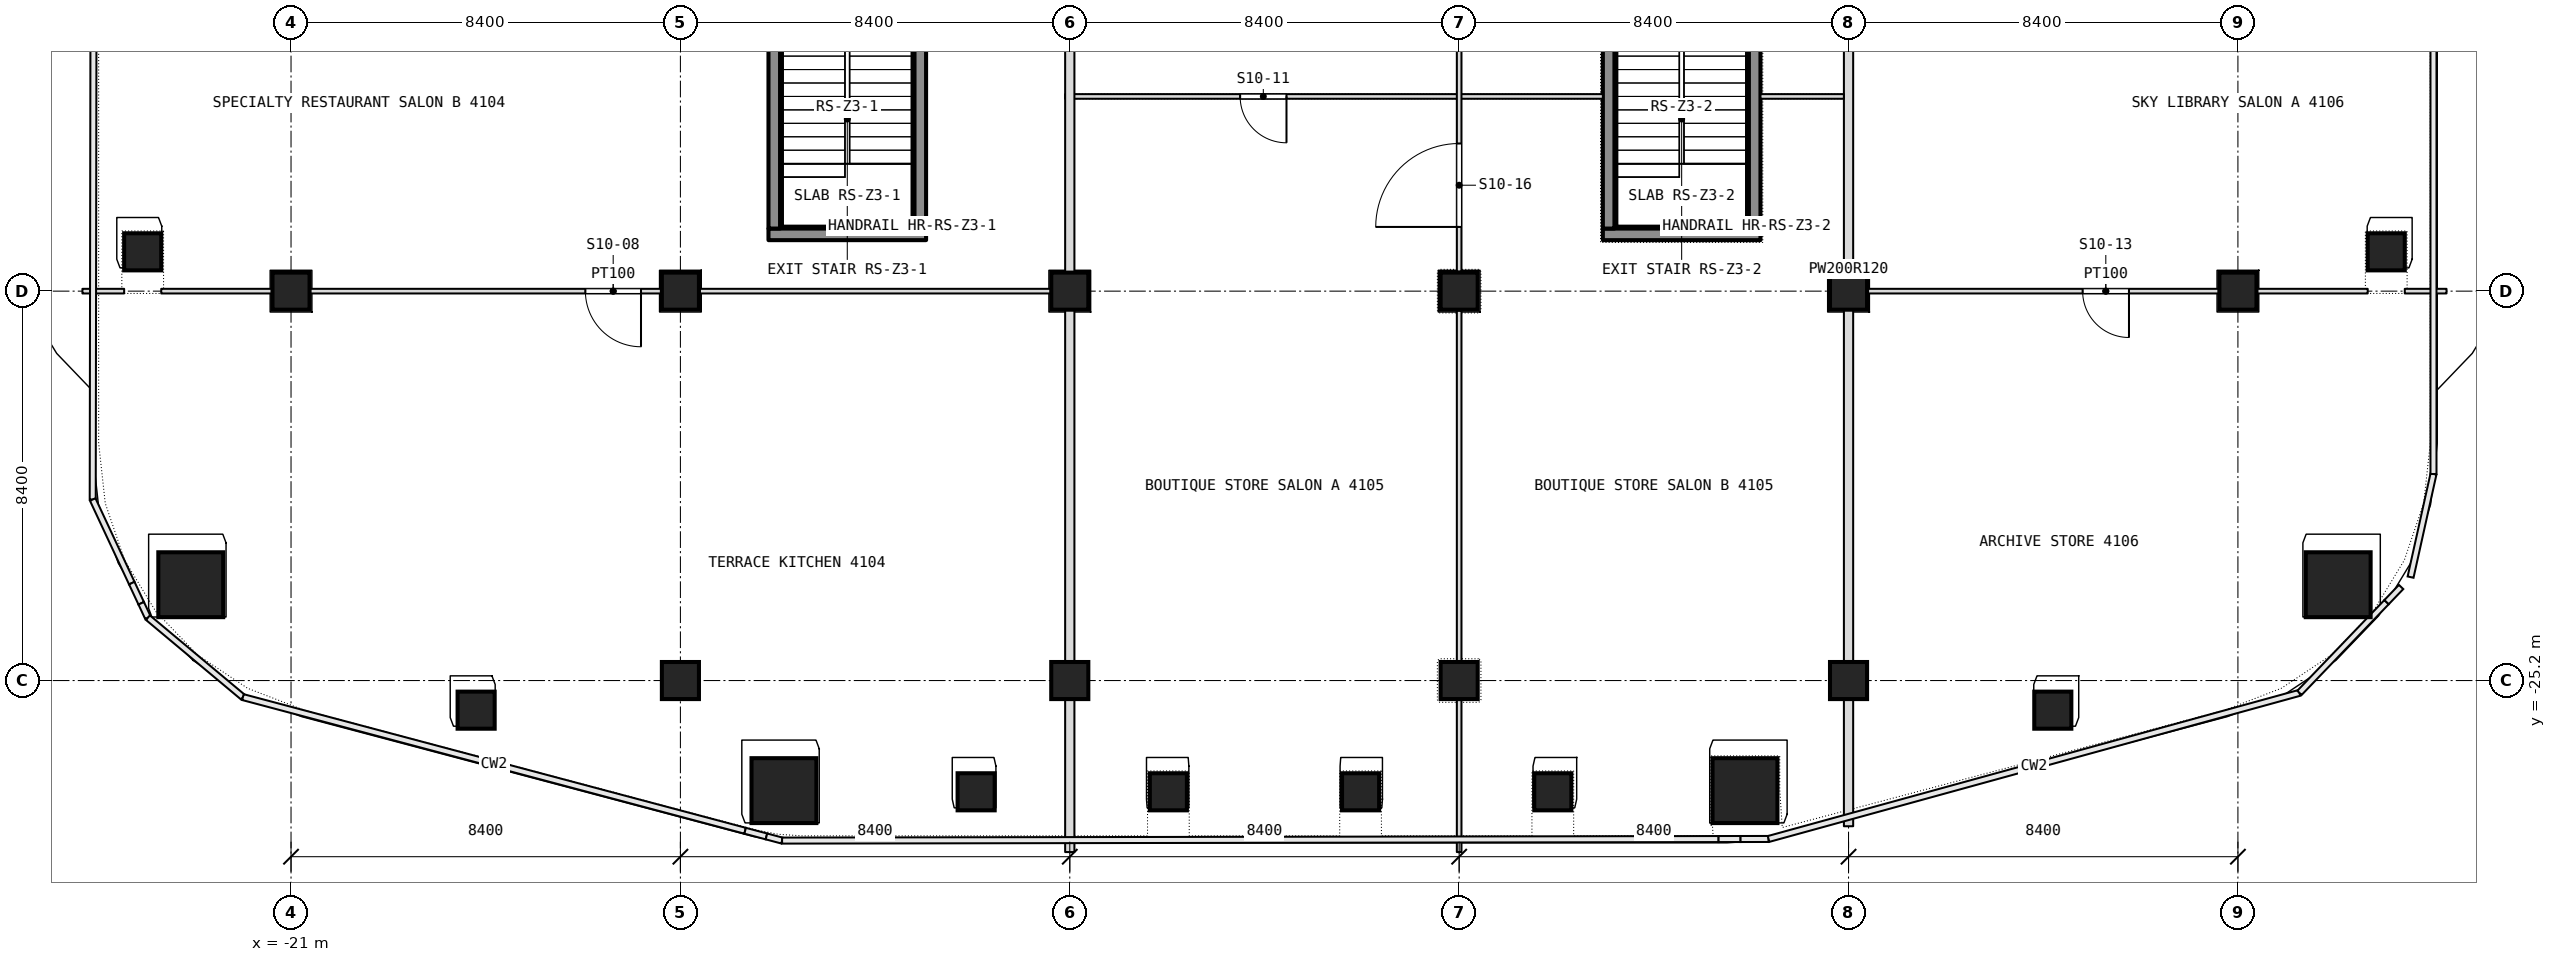
"""IFC4 building model, lengths in metres.
Left out: names, types, materials, properties, quantities, classifications, styles, units other than length and angle.
Written with IfcOpenShell. Run it as: python <this file> out.ifc"""

import sys

from ifc_helpers import new_model, si_unit, direction, frame, frame_2d, origin, origin_2d, place, context, subcontext, project, spatial, rectangle, extrude, element, fill, save


model = new_model("IFC4")
c1 = context("Model", 3, precision=1e-05, world=origin(), true_north=direction((0.0, 1.0)))
c2 = subcontext(c1, "Body", "Model", "MODEL_VIEW")
j1 = project(units=[si_unit("LENGTHUNIT", "METRE"), si_unit("PLANEANGLEUNIT", "RADIAN")], contexts=[c1])
p1 = place(None, origin())
s1 = spatial("IfcSite", under=j1, at=p1, CompositionType="ELEMENT")
p2 = place(p1, origin())
s2 = spatial("IfcBuilding", under=s1, at=p2, CompositionType="ELEMENT")
p3 = place(p2, frame((0.0, 0.0, 180.5)))
s3 = spatial("IfcBuildingStorey", under=s2, at=p3, CompositionType="ELEMENT", Elevation=180.5)
for number, where, z_axis, x_axis in (
    (1, (-23.163, -23.133, 0.0), (0.0, 0.0, 1.0), (1.0, 0.0, 0.0)),
    (2, (-10.366, -27.575, 0.0), (0.0, 0.0, 1.0), (1.0, 0.0, 0.0)),
    (3, (10.366, -27.575, 0.0), (0.0, 0.0, 1.0), (1.0, 0.0, 0.0)),
    (4, (23.163, -23.133, 0.0), (0.0, 0.0, 1.0), (1.0, 0.0, 0.0)),
):
    element("IfcColumn", number, at=place(p3, frame(where, z_axis=z_axis, x_axis=x_axis)), inside=s3, PredefinedType="COLUMN", context=c2, shape_type="SweptSolid", body=[
        extrude(rectangle(XDim=1.4, YDim=1.4, at=origin_2d()), origin(), (0.0, 0.0, 1.0), 7.2),
    ])
p4 = place(p3, frame((-21.0, -16.8, 0.0), z_axis=(0.0, 0.0, 1.0), x_axis=(1.0, 0.0, 0.0)))
e5 = element("IfcColumn", 5, at=p4, inside=s3, PredefinedType="COLUMN", context=c2, shape_type="SweptSolid", body=[
    extrude(rectangle(XDim=0.8, YDim=0.8, at=origin_2d()), origin(), (0.0, 0.0, 1.0), 7.2),
])
p5 = place(p3, frame((-12.6, -25.2, -0.26), z_axis=(0.0, 0.0, 1.0), x_axis=(1.0, 0.0, 0.0)))
e6 = element("IfcColumn", 6, at=p5, inside=s3, PredefinedType="COLUMN", context=c2, shape_type="SweptSolid", body=[
    extrude(rectangle(XDim=0.8, YDim=0.8, at=origin_2d()), origin(), (0.0, 0.0, 1.0), 7.46),
])
p6 = place(p3, frame((-12.6, -16.8, 0.0), z_axis=(0.0, 0.0, 1.0), x_axis=(1.0, 0.0, 0.0)))
e7 = element("IfcColumn", 7, at=p6, inside=s3, PredefinedType="COLUMN", context=c2, shape_type="SweptSolid", body=[
    extrude(rectangle(XDim=0.8, YDim=0.8, at=origin_2d()), origin(), (0.0, 0.0, 1.0), 7.2),
])
p7 = place(p3, frame((-4.2, -25.2, -0.26), z_axis=(0.0, 0.0, 1.0), x_axis=(1.0, 0.0, 0.0)))
e8 = element("IfcColumn", 8, at=p7, inside=s3, PredefinedType="COLUMN", context=c2, shape_type="SweptSolid", body=[
    extrude(rectangle(XDim=0.8, YDim=0.8, at=origin_2d()), origin(), (0.0, 0.0, 1.0), 7.46),
])
p8 = place(p3, frame((-4.2, -16.8, 0.0), z_axis=(0.0, 0.0, 1.0), x_axis=(1.0, 0.0, 0.0)))
e9 = element("IfcColumn", 9, at=p8, inside=s3, PredefinedType="COLUMN", context=c2, shape_type="SweptSolid", body=[
    extrude(rectangle(XDim=0.8, YDim=0.8, at=origin_2d()), origin(), (0.0, 0.0, 1.0), 7.2),
])
p9 = place(p3, frame((4.2, -25.2, -0.26), z_axis=(0.0, 0.0, 1.0), x_axis=(1.0, 0.0, 0.0)))
e10 = element("IfcColumn", 10, at=p9, inside=s3, PredefinedType="COLUMN", context=c2, shape_type="SweptSolid", body=[
    extrude(rectangle(XDim=0.8, YDim=0.8, at=origin_2d()), origin(), (0.0, 0.0, 1.0), 7.46),
])
p10 = place(p3, frame((4.2, -16.8, 0.0), z_axis=(0.0, 0.0, 1.0), x_axis=(1.0, 0.0, 0.0)))
e11 = element("IfcColumn", 11, at=p10, inside=s3, PredefinedType="COLUMN", context=c2, shape_type="SweptSolid", body=[
    extrude(rectangle(XDim=0.8, YDim=0.8, at=origin_2d()), origin(), (0.0, 0.0, 1.0), 7.2),
])
p11 = place(p3, frame((12.6, -25.2, -0.26), z_axis=(0.0, 0.0, 1.0), x_axis=(1.0, 0.0, 0.0)))
e12 = element("IfcColumn", 12, at=p11, inside=s3, PredefinedType="COLUMN", context=c2, shape_type="SweptSolid", body=[
    extrude(rectangle(XDim=0.8, YDim=0.8, at=origin_2d()), origin(), (0.0, 0.0, 1.0), 7.46),
])
for number, where, z_axis, x_axis in (
    (13, (12.6, -16.8, 0.0), (0.0, 0.0, 1.0), (1.0, 0.0, 0.0)),
    (14, (21.0, -16.8, 0.0), (0.0, 0.0, 1.0), (1.0, 0.0, 0.0)),
    (15, (-24.2, -15.952, 0.0), (0.0, 0.0, 1.0), (1.0, 0.0, 0.0)),
    (16, (24.2, -15.952, 0.0), (0.0, 0.0, 1.0), (1.0, 0.0, 0.0)),
    (17, (17.007, -25.839, 0.0), (0.0, 0.0, 1.0), (1.0, 0.0, 0.0)),
    (18, (6.22, -27.6, 0.0), (0.0, 0.0, 1.0), (1.0, 0.0, 0.0)),
    (19, (2.073, -27.6, 0.0), (0.0, 0.0, 1.0), (1.0, 0.0, 0.0)),
    (20, (-2.073, -27.6, 0.0), (0.0, 0.0, 1.0), (1.0, 0.0, 0.0)),
    (21, (-6.22, -27.6, 0.0), (0.0, 0.0, 1.0), (1.0, 0.0, 0.0)),
    (22, (-17.007, -25.839, 0.0), (0.0, 0.0, 1.0), (1.0, 0.0, 0.0)),
):
    element("IfcColumn", number, at=place(p3, frame(where, z_axis=z_axis, x_axis=x_axis)), inside=s3, PredefinedType="COLUMN", context=c2, shape_type="SweptSolid", body=[
        extrude(rectangle(XDim=0.8, YDim=0.8, at=origin_2d()), origin(), (0.0, 0.0, 1.0), 7.2),
    ])
p12 = place(p3, frame((-25.5, -16.8, 0.0), z_axis=(0.0, 0.0, 1.0), x_axis=(1.0, 0.0, 0.0)))
e23 = element("IfcWall", 23, at=p12, inside=s3, PredefinedType="PARTITIONING", context=c2, shape_type="SweptSolid", body=[
    extrude(rectangle(XDim=0.9, YDim=0.1, at=frame_2d((0.45, 0.0))), origin(), (0.0, 0.0, 1.0), 6.94),
])
p13 = place(p3, frame((-23.8, -16.8, 0.0), z_axis=(0.0, 0.0, 1.0), x_axis=(1.0, 0.0, 0.0)))
e24 = element("IfcWall", 24, at=p13, inside=s3, PredefinedType="PARTITIONING", context=c2, shape_type="SweptSolid", body=[
    extrude(rectangle(XDim=19.5, YDim=0.1, at=frame_2d((9.75, 0.0))), origin(), (0.0, 0.0, 1.0), 6.54),
])
p14 = place(p13, frame((9.15, 0.0, 0.0)))
e25 = element("IfcOpeningElement", 25, at=p14, cuts=e24, PredefinedType="OPENING", context=c2, shape_type="SweptSolid", body=[
    extrude(rectangle(XDim=1.2, YDim=2.1, at=frame_2d((0.6, 1.05))), frame((0.0, 0.05, 0.0), z_axis=(0.0, -1.0, 0.0), x_axis=(1.0, 0.0, 0.0)), (0.0, 0.0, 1.0), 0.1),
])
p15 = place(p3, frame((12.5, -16.8, 0.0), z_axis=(0.0, 0.0, 1.0), x_axis=(1.0, 0.0, 0.0)))
e26 = element("IfcWall", 26, at=p15, inside=s3, PredefinedType="PARTITIONING", context=c2, shape_type="SweptSolid", body=[
    extrude(rectangle(XDim=11.3, YDim=0.1, at=frame_2d((5.65, 0.0))), origin(), (0.0, 0.0, 1.0), 6.54),
])
p16 = place(p15, frame((5.15, 0.0, 0.0)))
e27 = element("IfcOpeningElement", 27, at=p16, cuts=e26, PredefinedType="OPENING", context=c2, shape_type="SweptSolid", body=[
    extrude(rectangle(XDim=1.0, YDim=2.1, at=frame_2d((0.5, 1.05))), frame((0.0, 0.05, 0.0), z_axis=(0.0, -1.0, 0.0), x_axis=(1.0, 0.0, 0.0)), (0.0, 0.0, 1.0), 0.1),
])
p17 = place(p3, frame((24.6, -16.8, 0.0), z_axis=(0.0, 0.0, 1.0), x_axis=(1.0, 0.0, 0.0)))
e28 = element("IfcWall", 28, at=p17, inside=s3, PredefinedType="PARTITIONING", context=c2, shape_type="SweptSolid", body=[
    extrude(rectangle(XDim=0.9, YDim=0.1, at=frame_2d((0.45, 0.0))), origin(), (0.0, 0.0, 1.0), 6.94),
])
p18 = place(p3, frame((12.6, -28.343, 0.0), z_axis=(0.0, 0.0, 1.0), x_axis=(0.0, 1.0, 0.0)))
e29 = element("IfcWall", 29, at=p18, inside=s3, PredefinedType="PARTITIONING", context=c2, shape_type="SweptSolid", body=[
    extrude(rectangle(XDim=24.043, YDim=0.2, at=frame_2d((12.021, 0.0))), origin(), (0.0, 0.0, 1.0), 6.94),
])
p19 = place(p3, frame((-4.3, -12.6, 0.0), z_axis=(0.0, 0.0, 1.0), x_axis=(1.0, 0.0, 0.0)))
e30 = element("IfcWall", 30, at=p19, inside=s3, PredefinedType="PARTITIONING", context=c2, shape_type="SweptSolid", body=[
    extrude(rectangle(XDim=11.6, YDim=0.1, at=frame_2d((5.8, 0.0))), origin(), (0.0, 0.0, 1.0), 6.94),
])
p20 = place(p19, frame((3.775, 0.0, 0.0)))
e31 = element("IfcOpeningElement", 31, at=p20, cuts=e30, PredefinedType="OPENING", context=c2, shape_type="SweptSolid", body=[
    extrude(rectangle(XDim=1.0, YDim=2.1, at=frame_2d((0.5, 1.05))), frame((0.0, 0.05, 0.0), z_axis=(0.0, -1.0, 0.0), x_axis=(1.0, 0.0, 0.0)), (0.0, 0.0, 1.0), 0.1),
])
p21 = place(p3, frame((10.7, -12.6, 0.0), z_axis=(0.0, 0.0, 1.0), x_axis=(1.0, 0.0, 0.0)))
e32 = element("IfcWall", 32, at=p21, inside=s3, PredefinedType="PARTITIONING", context=c2, shape_type="SweptSolid", body=[
    extrude(rectangle(XDim=1.8, YDim=0.1, at=frame_2d((0.9, 0.0))), origin(), (0.0, 0.0, 1.0), 6.94),
])
p22 = place(p3, frame((4.2, -28.9, 0.0), z_axis=(0.0, 0.0, 1.0), x_axis=(0.0, 1.0, 0.0)))
e33 = element("IfcWall", 33, at=p22, inside=s3, PredefinedType="PARTITIONING", context=c2, shape_type="SweptSolid", body=[
    extrude(rectangle(XDim=3.28, YDim=0.1, at=frame_2d((1.64, 0.0))), origin(), (0.0, 0.0, 1.0), 6.94),
])
p23 = place(p3, frame((4.2, -24.78, 0.0), z_axis=(0.0, 0.0, 1.0), x_axis=(0.0, 1.0, 0.0)))
e34 = element("IfcWall", 34, at=p23, inside=s3, PredefinedType="PARTITIONING", context=c2, shape_type="SweptSolid", body=[
    extrude(rectangle(XDim=7.56, YDim=0.1, at=frame_2d((3.78, 0.0))), origin(), (0.0, 0.0, 1.0), 6.94),
])
p24 = place(p3, frame((4.2, -16.38, 0.0), z_axis=(0.0, 0.0, 1.0), x_axis=(0.0, 1.0, 0.0)))
e35 = element("IfcWall", 35, at=p24, inside=s3, PredefinedType="PARTITIONING", context=c2, shape_type="SweptSolid", body=[
    extrude(rectangle(XDim=7.56, YDim=0.1, at=frame_2d((3.78, 0.0))), origin(), (0.0, 0.0, 1.0), 6.94),
])
p25 = place(p24, frame((4.795, 0.0, 0.0)))
e36 = element("IfcOpeningElement", 36, at=p25, cuts=e35, PredefinedType="OPENING", context=c2, shape_type="SweptSolid", body=[
    extrude(rectangle(XDim=1.8, YDim=2.1, at=frame_2d((0.9, 1.05))), frame((0.0, 0.05, 0.0), z_axis=(0.0, -1.0, 0.0), x_axis=(1.0, 0.0, 0.0)), (0.0, 0.0, 1.0), 0.1),
])
p26 = place(p24, frame((0.965, 0.0, 0.0)))
e37 = element("IfcOpeningElement", 37, at=p26, cuts=e35, PredefinedType="OPENING", context=c2, shape_type="SweptSolid", body=[
    extrude(rectangle(XDim=1.8, YDim=2.1, at=frame_2d((0.9, 1.05))), frame((0.0, 0.05, 0.0), z_axis=(0.0, -1.0, 0.0), x_axis=(1.0, 0.0, 0.0)), (0.0, 0.0, 1.0), 0.1),
])
p27 = place(p3, frame((-4.2, -28.9, 0.0), z_axis=(0.0, 0.0, 1.0), x_axis=(0.0, 1.0, 0.0)))
e38 = element("IfcWall", 38, at=p27, inside=s3, PredefinedType="PARTITIONING", context=c2, shape_type="SweptSolid", body=[
    extrude(rectangle(XDim=24.6, YDim=0.2, at=frame_2d((12.3, 0.0))), origin(), (0.0, 0.0, 1.0), 6.94),
])
p28 = place(p3, frame((-10.7, -15.575, -0.26), z_axis=(0.0, 0.0, 1.0), x_axis=(1.0, 0.0, 0.0)))
e39 = element("IfcWall", 39, at=p28, inside=s3, PredefinedType="SHEAR", context=c2, shape_type="SweptSolid", body=[
    extrude(rectangle(XDim=3.4, YDim=0.25, at=frame_2d((1.7, 0.0))), origin(), (0.0, 0.0, 1.0), 7.56),
])
for number, where, z_axis, x_axis in (
    (40, (-10.575, -15.45, -0.26), (0.0, 0.0, 1.0), (0.0, 1.0, 0.0)),
    (41, (-7.425, -15.45, -0.26), (0.0, 0.0, 1.0), (0.0, 1.0, 0.0)),
):
    element("IfcWall", number, at=place(p3, frame(where, z_axis=z_axis, x_axis=x_axis)), inside=s3, PredefinedType="SHEAR", context=c2, shape_type="SweptSolid", body=[
        extrude(rectangle(XDim=5.7, YDim=0.25, at=frame_2d((2.85, 0.0))), origin(), (0.0, 0.0, 1.0), 7.56),
    ])
p29 = place(p3, frame((7.3, -15.575, -0.26), z_axis=(0.0, 0.0, 1.0), x_axis=(1.0, 0.0, 0.0)))
e42 = element("IfcWall", 42, at=p29, inside=s3, PredefinedType="SHEAR", context=c2, shape_type="SweptSolid", body=[
    extrude(rectangle(XDim=3.4, YDim=0.25, at=frame_2d((1.7, 0.0))), origin(), (0.0, 0.0, 1.0), 7.56),
])
for number, where, z_axis, x_axis in (
    (43, (7.425, -15.45, -0.26), (0.0, 0.0, 1.0), (0.0, 1.0, 0.0)),
    (44, (10.575, -15.45, -0.26), (0.0, 0.0, 1.0), (0.0, 1.0, 0.0)),
):
    element("IfcWall", number, at=place(p3, frame(where, z_axis=z_axis, x_axis=x_axis)), inside=s3, PredefinedType="SHEAR", context=c2, shape_type="SweptSolid", body=[
        extrude(rectangle(XDim=5.7, YDim=0.25, at=frame_2d((2.85, 0.0))), origin(), (0.0, 0.0, 1.0), 7.56),
    ])
p30 = place(p14, origin())
e45 = element("IfcDoor", 45, at=p30, inside=s3, OperationType="SINGLE_SWING_LEFT", PredefinedType="DOOR", context=c2, shape_type="SweptSolid", body=[
    extrude(rectangle(XDim=1.2, YDim=2.1, at=frame_2d((0.6, 1.05))), frame((0.0, 0.025, 0.0), z_axis=(0.0, -1.0, 0.0), x_axis=(1.0, 0.0, 0.0)), (0.0, 0.0, 1.0), 0.05),
])
fill(e25, e45)
p31 = place(p16, origin())
e46 = element("IfcDoor", 46, at=p31, inside=s3, OperationType="SINGLE_SWING_LEFT", PredefinedType="DOOR", context=c2, shape_type="SweptSolid", body=[
    extrude(rectangle(XDim=1.0, YDim=2.1, at=frame_2d((0.5, 1.05))), frame((0.0, 0.025, 0.0), z_axis=(0.0, -1.0, 0.0), x_axis=(1.0, 0.0, 0.0)), (0.0, 0.0, 1.0), 0.05),
])
fill(e27, e46)
p32 = place(p20, origin())
e47 = element("IfcDoor", 47, at=p32, inside=s3, OperationType="SINGLE_SWING_RIGHT", PredefinedType="DOOR", context=c2, shape_type="SweptSolid", body=[
    extrude(rectangle(XDim=1.0, YDim=2.1, at=frame_2d((0.5, 1.05))), frame((0.0, 0.025, 0.0), z_axis=(0.0, -1.0, 0.0), x_axis=(1.0, 0.0, 0.0)), (0.0, 0.0, 1.0), 0.05),
])
fill(e31, e47)
p33 = place(p26, origin())
e48 = element("IfcDoor", 48, at=p33, inside=s3, OperationType="DOUBLE_DOOR_SINGLE_SWING", PredefinedType="DOOR", context=c2, shape_type="SweptSolid", body=[
    extrude(rectangle(XDim=1.8, YDim=2.1, at=frame_2d((0.9, 1.05))), frame((0.0, 0.025, 0.0), z_axis=(0.0, -1.0, 0.0), x_axis=(1.0, 0.0, 0.0)), (0.0, 0.0, 1.0), 0.05),
])
fill(e37, e48)
save(model, sys.argv[1])
